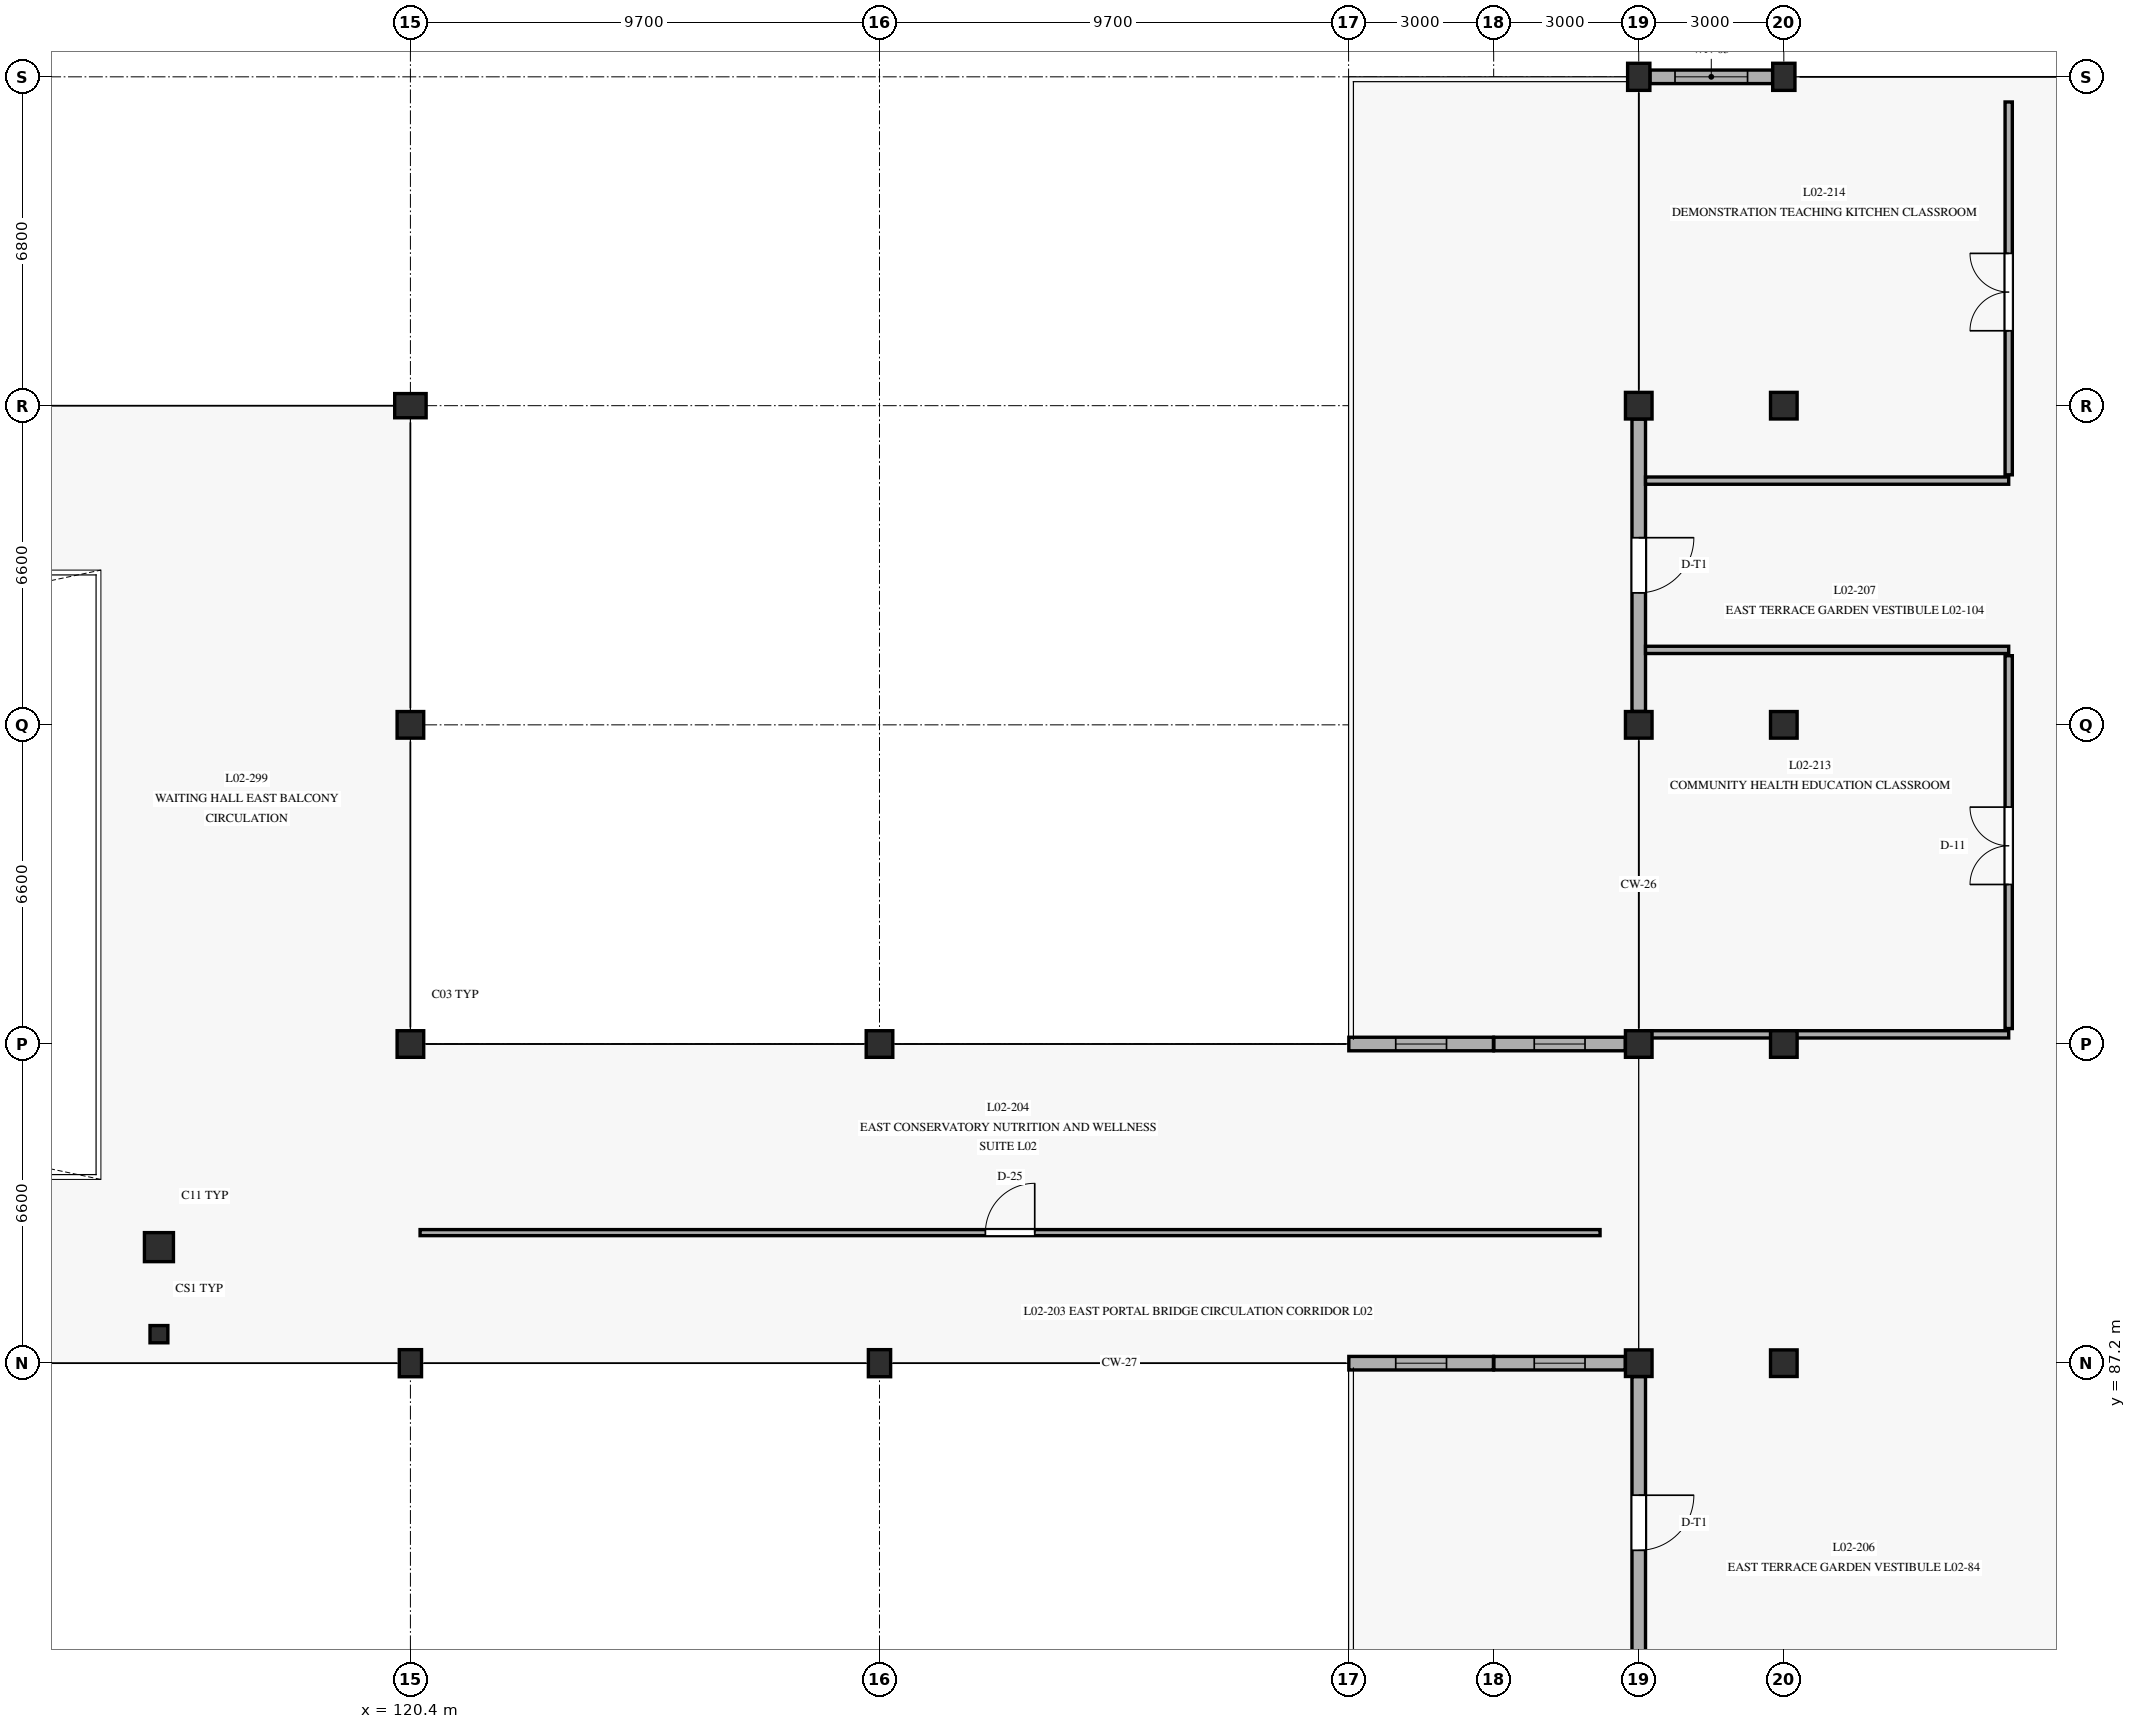
"""IFC4 building model, lengths in metres.
Left out: names, types, materials, properties, quantities, classifications, styles, units other than length and angle.
Written with IfcOpenShell. Run it as: python <this file> out.ifc"""

import sys

from ifc_helpers import new_model, si_unit, direction, frame, frame_2d, origin, origin_with_axes, origin_2d, place, context, subcontext, project, spatial, rectangle, circle, i_section, extrude, element, fill, save


model = new_model("IFC4")
c1 = context("Model", 3, precision=1e-05, world=origin(), true_north=direction((0.0, 1.0)))
c2 = subcontext(c1, "Body", "Model", "MODEL_VIEW")
j1 = project(units=[si_unit("LENGTHUNIT", "METRE"), si_unit("PLANEANGLEUNIT", "RADIAN")], contexts=[c1])
p1 = place(None, origin())
s1 = spatial("IfcSite", under=j1, at=p1, CompositionType="ELEMENT")
p2 = place(p1, origin())
s2 = spatial("IfcBuilding", under=s1, at=p2, CompositionType="ELEMENT")
p3 = place(p2, frame((0.0, 0.0, 4.8)))
s3 = spatial("IfcBuildingStorey", under=s2, at=p3, CompositionType="ELEMENT", Elevation=4.8)
p4 = place(p3, frame((120.4, 87.2, 0.0), z_axis=(0.0, 0.0, 1.0), x_axis=(1.0, 0.0, 0.0)))
e1 = element("IfcColumn", 1, at=p4, inside=s3, PredefinedType="COLUMN", context=c2, shape_type="SweptSolid", body=[
    extrude(rectangle(XDim=0.46, YDim=0.56, at=origin_2d()), origin(), (0.0, 0.0, 1.0), 4.5),
])
for number, where, z_axis, x_axis in (
    (2, (120.4, 93.8, 0.0), (0.0, 0.0, 1.0), (1.0, 0.0, 0.0)),
    (3, (120.4, 100.4, 0.0), (0.0, 0.0, 1.0), (1.0, 0.0, 0.0)),
):
    element("IfcColumn", number, at=place(p3, frame(where, z_axis=z_axis, x_axis=x_axis)), inside=s3, PredefinedType="COLUMN", context=c2, shape_type="SweptSolid", body=[
        extrude(rectangle(XDim=0.55, YDim=0.55, at=origin_2d()), origin(), (0.0, 0.0, 1.0), 4.5),
    ])
p5 = place(p3, frame((120.4, 107.0, 0.0), z_axis=(0.0, 0.0, 1.0), x_axis=(1.0, 0.0, 0.0)))
e4 = element("IfcColumn", 4, at=p5, inside=s3, PredefinedType="COLUMN", context=c2, shape_type="SweptSolid", body=[
    extrude(rectangle(XDim=0.65, YDim=0.5, at=origin_2d()), origin(), (0.0, 0.0, 1.0), 4.5),
])
p6 = place(p3, frame((130.1, 87.2, 0.0), z_axis=(0.0, 0.0, 1.0), x_axis=(1.0, 0.0, 0.0)))
e5 = element("IfcColumn", 5, at=p6, inside=s3, PredefinedType="COLUMN", context=c2, shape_type="SweptSolid", body=[
    extrude(rectangle(XDim=0.46, YDim=0.56, at=origin_2d()), origin(), (0.0, 0.0, 1.0), 4.5),
])
for number, where, z_axis, x_axis in (
    (6, (130.1, 93.8, 0.0), (0.0, 0.0, 1.0), (1.0, 0.0, 0.0)),
    (7, (145.8, 87.2, 0.0), (0.0, 0.0, 1.0), (1.0, 0.0, 0.0)),
    (8, (145.8, 93.8, 0.0), (0.0, 0.0, 1.0), (1.0, 0.0, 0.0)),
    (9, (145.8, 100.4, 0.0), (0.0, 0.0, 1.0), (1.0, 0.0, 0.0)),
    (10, (145.8, 107.0, 0.0), (0.0, 0.0, 1.0), (1.0, 0.0, 0.0)),
):
    element("IfcColumn", number, at=place(p3, frame(where, z_axis=z_axis, x_axis=x_axis)), inside=s3, PredefinedType="COLUMN", context=c2, shape_type="SweptSolid", body=[
        extrude(rectangle(XDim=0.55, YDim=0.55, at=origin_2d()), origin(), (0.0, 0.0, 1.0), 4.5),
    ])
p7 = place(p3, frame((145.8, 113.8, 0.0), z_axis=(0.0, 0.0, 1.0), x_axis=(1.0, 0.0, 0.0)))
e11 = element("IfcColumn", 11, at=p7, inside=s3, PredefinedType="COLUMN", context=c2, shape_type="SweptSolid", body=[
    extrude(rectangle(XDim=0.46, YDim=0.56, at=origin_2d()), origin(), (0.0, 0.0, 1.0), 4.5),
])
for number, where, z_axis, x_axis in (
    (12, (148.8, 87.2, 0.0), (0.0, 0.0, 1.0), (1.0, 0.0, 0.0)),
    (13, (148.8, 93.8, 0.0), (0.0, 0.0, 1.0), (1.0, 0.0, 0.0)),
    (14, (148.8, 100.4, 0.0), (0.0, 0.0, 1.0), (1.0, 0.0, 0.0)),
    (15, (148.8, 107.0, 0.0), (0.0, 0.0, 1.0), (1.0, 0.0, 0.0)),
):
    element("IfcColumn", number, at=place(p3, frame(where, z_axis=z_axis, x_axis=x_axis)), inside=s3, PredefinedType="COLUMN", context=c2, shape_type="SweptSolid", body=[
        extrude(rectangle(XDim=0.55, YDim=0.55, at=origin_2d()), origin(), (0.0, 0.0, 1.0), 4.5),
    ])
p8 = place(p3, frame((148.8, 113.8, 0.0), z_axis=(0.0, 0.0, 1.0), x_axis=(1.0, 0.0, 0.0)))
e16 = element("IfcColumn", 16, at=p8, inside=s3, PredefinedType="COLUMN", context=c2, shape_type="SweptSolid", body=[
    extrude(rectangle(XDim=0.46, YDim=0.56, at=origin_2d()), origin(), (0.0, 0.0, 1.0), 4.5),
])
p9 = place(p3, frame((115.2, 89.6, 0.0), z_axis=(0.0, 0.0, 1.0), x_axis=(1.0, 0.0, 0.0)))
e17 = element("IfcColumn", 17, at=p9, inside=s3, PredefinedType="COLUMN", context=c2, shape_type="SweptSolid", body=[
    extrude(circle(Radius=0.3, at=origin_2d()), origin(), (0.0, 0.0, 1.0), 4.5),
])
p10 = place(p3, frame((115.2, 87.8, 0.0), z_axis=(0.0, 0.0, 1.0), x_axis=(1.0, 0.0, 0.0)))
e18 = element("IfcColumn", 18, at=p10, inside=s3, PredefinedType="COLUMN", context=c2, shape_type="SweptSolid", body=[
    extrude(i_section(OverallWidth=0.369, OverallDepth=0.356, WebThickness=0.011, FlangeThickness=0.018, at=origin_2d()), origin(), (0.0, 0.0, 1.0), 4.5),
])
p11 = place(p3, frame((145.8, 86.923, 0.0), z_axis=(0.0, 0.0, 1.0), x_axis=(0.0, -1.0, 0.0)))
e19 = element("IfcWall", 19, at=p11, inside=s3, PredefinedType="SOLIDWALL", context=c2, shape_type="SweptSolid", body=[
    extrude(rectangle(XDim=6.046, YDim=0.28, at=frame_2d((3.023, 0.0))), origin(), (0.0, 0.0, 1.0), 3.74),
])
p12 = place(p11, frame((2.453, 0.0, 0.0)))
e20 = element("IfcOpeningElement", 20, at=p12, cuts=e19, PredefinedType="OPENING", context=c2, shape_type="SweptSolid", body=[
    extrude(rectangle(XDim=1.14, YDim=2.3, at=frame_2d((0.57, 1.15))), frame((0.0, 0.15, 0.0), z_axis=(0.0, -1.0, 0.0), x_axis=(1.0, 0.0, 0.0)), (0.0, 0.0, 1.0), 0.3),
])
p13 = place(p3, frame((145.8, 106.723, 0.0), z_axis=(0.0, 0.0, 1.0), x_axis=(0.0, -1.0, 0.0)))
e21 = element("IfcWall", 21, at=p13, inside=s3, PredefinedType="SOLIDWALL", context=c2, shape_type="SweptSolid", body=[
    extrude(rectangle(XDim=6.046, YDim=0.28, at=frame_2d((3.023, 0.0))), origin(), (0.0, 0.0, 1.0), 3.79),
])
p14 = place(p13, frame((2.453, 0.0, 0.0)))
e22 = element("IfcOpeningElement", 22, at=p14, cuts=e21, PredefinedType="OPENING", context=c2, shape_type="SweptSolid", body=[
    extrude(rectangle(XDim=1.14, YDim=2.3, at=frame_2d((0.57, 1.15))), frame((0.0, 0.15, 0.0), z_axis=(0.0, -1.0, 0.0), x_axis=(1.0, 0.0, 0.0)), (0.0, 0.0, 1.0), 0.3),
])
p15 = place(p3, frame((148.568, 113.8, 0.0), z_axis=(0.0, 0.0, 1.0), x_axis=(-1.0, 0.0, 0.0)))
e23 = element("IfcWall", 23, at=p15, inside=s3, PredefinedType="SOLIDWALL", context=c2, shape_type="SweptSolid", body=[
    extrude(rectangle(XDim=2.536, YDim=0.28, at=frame_2d((1.268, 0.0))), origin(), (0.0, 0.0, 1.0), 3.75),
])
p16 = place(p15, frame((0.518, 0.0, 0.9)))
e24 = element("IfcOpeningElement", 24, at=p16, cuts=e23, PredefinedType="OPENING", context=c2, shape_type="SweptSolid", body=[
    extrude(rectangle(XDim=1.5, YDim=2.2, at=frame_2d((0.75, 1.1))), frame((0.0, 0.15, 0.0), z_axis=(0.0, -1.0, 0.0), x_axis=(1.0, 0.0, 0.0)), (0.0, 0.0, 1.0), 0.3),
])
p17 = place(p3, frame((139.805, 87.2, 0.0), z_axis=(0.0, 0.0, 1.0), x_axis=(1.0, 0.0, 0.0)))
e25 = element("IfcWall", 25, at=p17, inside=s3, PredefinedType="SOLIDWALL", context=c2, shape_type="SweptSolid", body=[
    extrude(rectangle(XDim=2.99, YDim=0.28, at=frame_2d((1.495, 0.0))), origin(), (0.0, 0.0, 1.0), 4.25),
])
p18 = place(p17, frame((0.97, 0.0, 0.85)))
e26 = element("IfcOpeningElement", 26, at=p18, cuts=e25, PredefinedType="OPENING", context=c2, shape_type="SweptSolid", body=[
    extrude(rectangle(XDim=1.05, YDim=2.2, at=frame_2d((0.525, 1.1))), frame((0.0, 0.15, 0.0), z_axis=(0.0, -1.0, 0.0), x_axis=(1.0, 0.0, 0.0)), (0.0, 0.0, 1.0), 0.3),
])
p19 = place(p3, frame((142.795, 93.8, 0.0), z_axis=(0.0, 0.0, 1.0), x_axis=(-1.0, 0.0, 0.0)))
e27 = element("IfcWall", 27, at=p19, inside=s3, PredefinedType="SOLIDWALL", context=c2, shape_type="SweptSolid", body=[
    extrude(rectangle(XDim=2.99, YDim=0.28, at=frame_2d((1.495, 0.0))), origin(), (0.0, 0.0, 1.0), 4.25),
])
p20 = place(p19, frame((0.97, 0.0, 0.85)))
e28 = element("IfcOpeningElement", 28, at=p20, cuts=e27, PredefinedType="OPENING", context=c2, shape_type="SweptSolid", body=[
    extrude(rectangle(XDim=1.05, YDim=2.2, at=frame_2d((0.525, 1.1))), frame((0.0, 0.15, 0.0), z_axis=(0.0, -1.0, 0.0), x_axis=(1.0, 0.0, 0.0)), (0.0, 0.0, 1.0), 0.3),
])
p21 = place(p3, frame((142.805, 87.2, 0.0), z_axis=(0.0, 0.0, 1.0), x_axis=(1.0, 0.0, 0.0)))
e29 = element("IfcWall", 29, at=p21, inside=s3, PredefinedType="SOLIDWALL", context=c2, shape_type="SweptSolid", body=[
    extrude(rectangle(XDim=2.718, YDim=0.28, at=frame_2d((1.359, 0.0))), origin(), (0.0, 0.0, 1.0), 4.2),
])
p22 = place(p21, frame((0.834, 0.0, 0.85)))
e30 = element("IfcOpeningElement", 30, at=p22, cuts=e29, PredefinedType="OPENING", context=c2, shape_type="SweptSolid", body=[
    extrude(rectangle(XDim=1.05, YDim=2.2, at=frame_2d((0.525, 1.1))), frame((0.0, 0.15, 0.0), z_axis=(0.0, -1.0, 0.0), x_axis=(1.0, 0.0, 0.0)), (0.0, 0.0, 1.0), 0.3),
])
p23 = place(p3, frame((145.523, 93.8, 0.0), z_axis=(0.0, 0.0, 1.0), x_axis=(-1.0, 0.0, 0.0)))
e31 = element("IfcWall", 31, at=p23, inside=s3, PredefinedType="SOLIDWALL", context=c2, shape_type="SweptSolid", body=[
    extrude(rectangle(XDim=2.718, YDim=0.28, at=frame_2d((1.359, 0.0))), origin(), (0.0, 0.0, 1.0), 4.2),
])
p24 = place(p23, frame((0.834, 0.0, 0.85)))
e32 = element("IfcOpeningElement", 32, at=p24, cuts=e31, PredefinedType="OPENING", context=c2, shape_type="SweptSolid", body=[
    extrude(rectangle(XDim=1.05, YDim=2.2, at=frame_2d((0.525, 1.1))), frame((0.0, 0.15, 0.0), z_axis=(0.0, -1.0, 0.0), x_axis=(1.0, 0.0, 0.0)), (0.0, 0.0, 1.0), 0.3),
])
p25 = place(p3, frame((120.6, 89.9, 0.0), z_axis=(0.0, 0.0, 1.0), x_axis=(1.0, 0.0, 0.0)))
e33 = element("IfcWall", 33, at=p25, inside=s3, PredefinedType="PARTITIONING", context=c2, shape_type="SweptSolid", body=[
    extrude(rectangle(XDim=24.4, YDim=0.125, at=frame_2d((12.2, 0.0))), origin(), (0.0, 0.0, 1.0), 3.815),
])
p26 = place(p25, frame((11.69, 0.0, 0.0)))
e34 = element("IfcOpeningElement", 34, at=p26, cuts=e33, PredefinedType="OPENING", context=c2, shape_type="SweptSolid", body=[
    extrude(rectangle(XDim=1.02, YDim=2.18, at=frame_2d((0.51, 1.09))), frame((0.0, 0.073, 0.0), z_axis=(0.0, -1.0, 0.0), x_axis=(1.0, 0.0, 0.0)), (0.0, 0.0, 1.0), 0.145),
])
p27 = place(p3, frame((153.45, 94.12, 0.0), z_axis=(0.0, 0.0, 1.0), x_axis=(0.0, 1.0, 0.0)))
e35 = element("IfcWall", 35, at=p27, inside=s3, PredefinedType="PARTITIONING", context=c2, shape_type="SweptSolid", body=[
    extrude(rectangle(XDim=7.71, YDim=0.15, at=frame_2d((3.855, 0.0))), origin(), (0.0, 0.0, 1.0), 3.795),
])
p28 = place(p27, frame((2.979, 0.0, 0.0)))
e36 = element("IfcOpeningElement", 36, at=p28, cuts=e35, PredefinedType="OPENING", context=c2, shape_type="SweptSolid", body=[
    extrude(rectangle(XDim=1.6, YDim=2.25, at=frame_2d((0.8, 1.125))), frame((0.0, 0.085, 0.0), z_axis=(0.0, -1.0, 0.0), x_axis=(1.0, 0.0, 0.0)), (0.0, 0.0, 1.0), 0.17),
])
p29 = place(p3, frame((145.94, 94.0, 0.0), z_axis=(0.0, 0.0, 1.0), x_axis=(1.0, 0.0, 0.0)))
e37 = element("IfcWall", 37, at=p29, inside=s3, PredefinedType="PARTITIONING", context=c2, shape_type="SweptSolid", body=[
    extrude(rectangle(XDim=7.51, YDim=0.15, at=frame_2d((3.755, 0.0))), origin(), (0.0, 0.0, 1.0), 3.735),
])
p30 = place(p3, frame((145.94, 101.95, 0.0), z_axis=(0.0, 0.0, 1.0), x_axis=(1.0, 0.0, 0.0)))
e38 = element("IfcWall", 38, at=p30, inside=s3, PredefinedType="PARTITIONING", context=c2, shape_type="SweptSolid", body=[
    extrude(rectangle(XDim=7.51, YDim=0.15, at=frame_2d((3.755, 0.0))), origin(), (0.0, 0.0, 1.0), 3.785),
])
p31 = place(p3, frame((153.45, 105.57, 0.0), z_axis=(0.0, 0.0, 1.0), x_axis=(0.0, 1.0, 0.0)))
e39 = element("IfcWall", 39, at=p31, inside=s3, PredefinedType="PARTITIONING", context=c2, shape_type="SweptSolid", body=[
    extrude(rectangle(XDim=7.71, YDim=0.15, at=frame_2d((3.855, 0.0))), origin(), (0.0, 0.0, 1.0), 3.795),
])
p32 = place(p31, frame((2.979, 0.0, 0.0)))
e40 = element("IfcOpeningElement", 40, at=p32, cuts=e39, PredefinedType="OPENING", context=c2, shape_type="SweptSolid", body=[
    extrude(rectangle(XDim=1.6, YDim=2.25, at=frame_2d((0.8, 1.125))), frame((0.0, 0.085, 0.0), z_axis=(0.0, -1.0, 0.0), x_axis=(1.0, 0.0, 0.0)), (0.0, 0.0, 1.0), 0.17),
])
p33 = place(p3, frame((145.94, 105.45, 0.0), z_axis=(0.0, 0.0, 1.0), x_axis=(1.0, 0.0, 0.0)))
e41 = element("IfcWall", 41, at=p33, inside=s3, PredefinedType="PARTITIONING", context=c2, shape_type="SweptSolid", body=[
    extrude(rectangle(XDim=7.51, YDim=0.15, at=frame_2d((3.755, 0.0))), origin(), (0.0, 0.0, 1.0), 3.785),
])
p34 = place(p12, frame((1.14, 0.0, 0.0), z_axis=(0.0, 0.0, 1.0), x_axis=(-1.0, 0.0, 0.0)))
e42 = element("IfcDoor", 42, at=p34, inside=s3, OperationType="SINGLE_SWING_RIGHT", PredefinedType="DOOR", context=c2, shape_type="SweptSolid", body=[
    extrude(rectangle(XDim=1.14, YDim=2.3, at=frame_2d((0.57, 1.15))), frame((0.0, 0.025, 0.0), z_axis=(0.0, -1.0, 0.0), x_axis=(1.0, 0.0, 0.0)), (0.0, 0.0, 1.0), 0.05),
])
fill(e20, e42)
p35 = place(p14, frame((1.14, 0.0, 0.0), z_axis=(0.0, 0.0, 1.0), x_axis=(-1.0, 0.0, 0.0)))
e43 = element("IfcDoor", 43, at=p35, inside=s3, OperationType="SINGLE_SWING_RIGHT", PredefinedType="DOOR", context=c2, shape_type="SweptSolid", body=[
    extrude(rectangle(XDim=1.14, YDim=2.3, at=frame_2d((0.57, 1.15))), frame((0.0, 0.025, 0.0), z_axis=(0.0, -1.0, 0.0), x_axis=(1.0, 0.0, 0.0)), (0.0, 0.0, 1.0), 0.05),
])
fill(e22, e43)
p36 = place(p16, origin_with_axes())
e44 = element("IfcWindow", 44, at=p36, inside=s3, PartitioningType="SINGLE_PANEL", PredefinedType="WINDOW", context=c2, shape_type="SweptSolid", body=[
    extrude(rectangle(XDim=1.5, YDim=2.2, at=frame_2d((0.75, 1.1))), frame((0.0, 0.03, 0.0), z_axis=(0.0, -1.0, 0.0), x_axis=(1.0, 0.0, 0.0)), (0.0, 0.0, 1.0), 0.06),
])
fill(e24, e44)
p37 = place(p18, origin_with_axes())
e45 = element("IfcWindow", 45, at=p37, inside=s3, PartitioningType="SINGLE_PANEL", PredefinedType="WINDOW", context=c2, shape_type="SweptSolid", body=[
    extrude(rectangle(XDim=1.05, YDim=2.2, at=frame_2d((0.525, 1.1))), frame((0.0, 0.03, 0.0), z_axis=(0.0, -1.0, 0.0), x_axis=(1.0, 0.0, 0.0)), (0.0, 0.0, 1.0), 0.06),
])
fill(e26, e45)
p38 = place(p20, origin_with_axes())
e46 = element("IfcWindow", 46, at=p38, inside=s3, PartitioningType="SINGLE_PANEL", PredefinedType="WINDOW", context=c2, shape_type="SweptSolid", body=[
    extrude(rectangle(XDim=1.05, YDim=2.2, at=frame_2d((0.525, 1.1))), frame((0.0, 0.03, 0.0), z_axis=(0.0, -1.0, 0.0), x_axis=(1.0, 0.0, 0.0)), (0.0, 0.0, 1.0), 0.06),
])
fill(e28, e46)
p39 = place(p22, origin_with_axes())
e47 = element("IfcWindow", 47, at=p39, inside=s3, PartitioningType="SINGLE_PANEL", PredefinedType="WINDOW", context=c2, shape_type="SweptSolid", body=[
    extrude(rectangle(XDim=1.05, YDim=2.2, at=frame_2d((0.525, 1.1))), frame((0.0, 0.03, 0.0), z_axis=(0.0, -1.0, 0.0), x_axis=(1.0, 0.0, 0.0)), (0.0, 0.0, 1.0), 0.06),
])
fill(e30, e47)
p40 = place(p24, origin_with_axes())
e48 = element("IfcWindow", 48, at=p40, inside=s3, PartitioningType="SINGLE_PANEL", PredefinedType="WINDOW", context=c2, shape_type="SweptSolid", body=[
    extrude(rectangle(XDim=1.05, YDim=2.2, at=frame_2d((0.525, 1.1))), frame((0.0, 0.03, 0.0), z_axis=(0.0, -1.0, 0.0), x_axis=(1.0, 0.0, 0.0)), (0.0, 0.0, 1.0), 0.06),
])
fill(e32, e48)
p41 = place(p26, origin_with_axes())
e49 = element("IfcDoor", 49, at=p41, inside=s3, OperationType="SINGLE_SWING_RIGHT", PredefinedType="DOOR", context=c2, shape_type="SweptSolid", body=[
    extrude(rectangle(XDim=1.02, YDim=2.18, at=frame_2d((0.51, 1.09))), frame((0.0, 0.025, 0.0), z_axis=(0.0, -1.0, 0.0), x_axis=(1.0, 0.0, 0.0)), (0.0, 0.0, 1.0), 0.05),
])
fill(e34, e49)
p42 = place(p28, origin_with_axes())
e50 = element("IfcDoor", 50, at=p42, inside=s3, OperationType="DOUBLE_DOOR_SINGLE_SWING", PredefinedType="DOOR", context=c2, shape_type="SweptSolid", body=[
    extrude(rectangle(XDim=1.6, YDim=2.25, at=frame_2d((0.8, 1.125))), frame((0.0, 0.025, 0.0), z_axis=(0.0, -1.0, 0.0), x_axis=(1.0, 0.0, 0.0)), (0.0, 0.0, 1.0), 0.05),
])
fill(e36, e50)
p43 = place(p32, origin_with_axes())
e51 = element("IfcDoor", 51, at=p43, inside=s3, OperationType="DOUBLE_DOOR_SINGLE_SWING", PredefinedType="DOOR", context=c2, shape_type="SweptSolid", body=[
    extrude(rectangle(XDim=1.6, YDim=2.25, at=frame_2d((0.8, 1.125))), frame((0.0, 0.025, 0.0), z_axis=(0.0, -1.0, 0.0), x_axis=(1.0, 0.0, 0.0)), (0.0, 0.0, 1.0), 0.05),
])
fill(e40, e51)
save(model, sys.argv[1])
